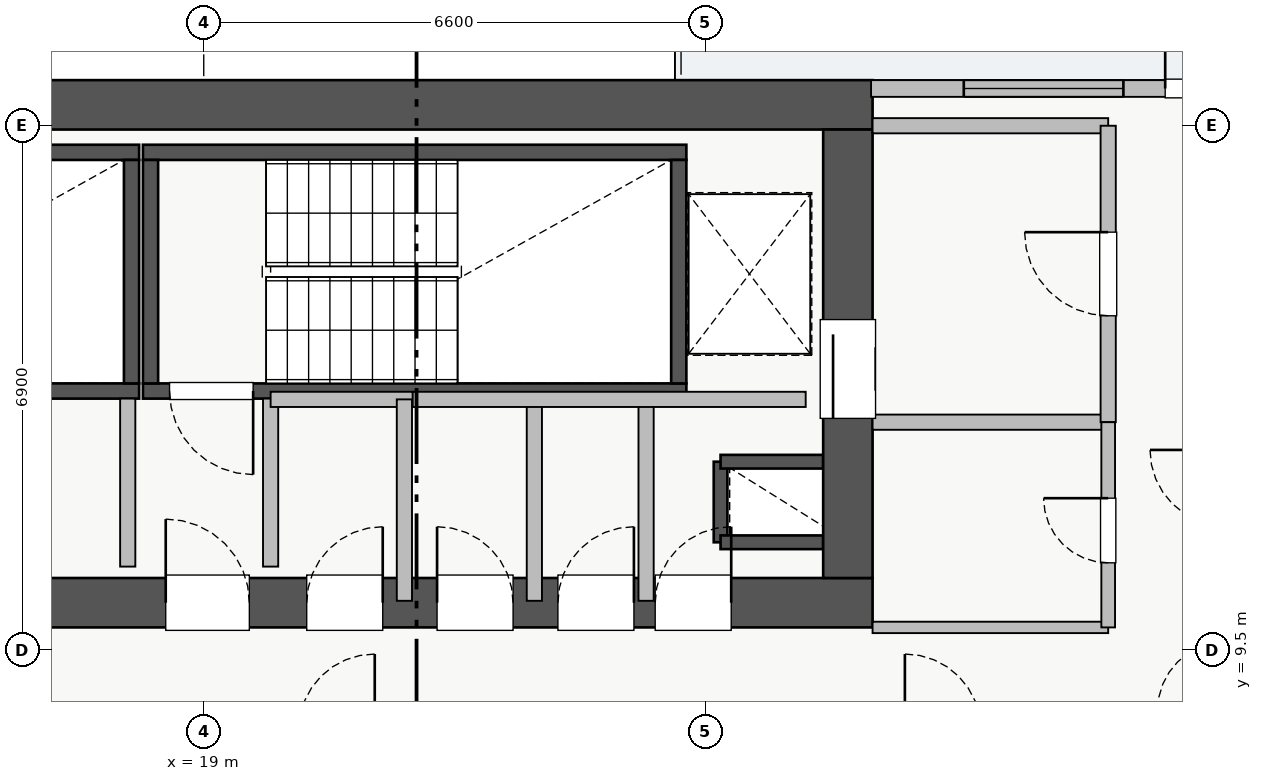
"""IFC4 building model, lengths in metres.
Left out: names, types, materials, properties, quantities, classifications, styles, units other than length and angle.
Written with IfcOpenShell. Run it as: python <this file> out.ifc"""

import sys

from ifc_helpers import new_model, si_unit, direction, frame, frame_2d, origin, place, context, subcontext, project, spatial, rectangle, extrude, source, transform, mapped, element, fill, save


model = new_model("IFC4")
c1 = context("Model", 3, precision=1e-05, world=origin(), true_north=direction((0.0, 1.0)))
c2 = subcontext(c1, "Body", "Model", "MODEL_VIEW")
j1 = project(units=[si_unit("LENGTHUNIT", "METRE"), si_unit("PLANEANGLEUNIT", "RADIAN")], contexts=[c1])
p1 = place(None, origin())
s1 = spatial("IfcSite", under=j1, at=p1, CompositionType="ELEMENT")
p2 = place(p1, origin())
s2 = spatial("IfcBuilding", under=s1, at=p2, CompositionType="ELEMENT")
p3 = place(p2, frame((0.0, 0.0, 153.5)))
s3 = spatial("IfcBuildingStorey", under=s2, at=p3, CompositionType="ELEMENT", Elevation=153.5)
p4 = place(p3, frame((25.8, 10.92, 0.0), z_axis=(0.0, 0.0, 1.0), x_axis=(0.0, 1.0, 0.0)))
e1 = element("IfcWall", 1, at=p4, inside=s3, PredefinedType="SHEAR", context=c2, shape_type="SweptSolid", body=[
    extrude(rectangle(XDim=1.06, YDim=0.18, at=frame_2d((0.53, 0.0))), origin(), (0.0, 0.0, 1.0), 3.07),
])
for number, where, z_axis, x_axis in (
    (2, (25.8, 11.98, 0.0), (0.0, 0.0, 1.0), (1.0, 0.0, 0.0)),
    (3, (25.8, 10.92, 0.0), (0.0, 0.0, 1.0), (1.0, 0.0, 0.0)),
):
    element("IfcWall", number, at=place(p3, frame(where, z_axis=z_axis, x_axis=x_axis)), inside=s3, PredefinedType="SHEAR", context=c2, shape_type="SweptSolid", body=[
        extrude(rectangle(XDim=1.35, YDim=0.18, at=frame_2d((0.675, 0.0))), origin(), (0.0, 0.0, 1.0), 3.07),
    ])
p5 = place(p3, frame((10.85, 12.91, 0.0), z_axis=(0.0, 0.0, 1.0), x_axis=(1.0, 0.0, 0.0)))
e4 = element("IfcWall", 4, at=p5, inside=s3, PredefinedType="SHEAR", context=c2, shape_type="SweptSolid", body=[
    extrude(rectangle(XDim=7.3, YDim=0.2, at=frame_2d((3.65, 0.0))), origin(), (0.0, 0.0, 1.0), 3.25),
])
p6 = place(p5, frame((0.35, 0.0, 0.0)))
e5 = element("IfcOpeningElement", 5, at=p6, cuts=e4, PredefinedType="OPENING", context=c2, shape_type="SweptSolid", body=[
    extrude(rectangle(XDim=1.1, YDim=2.05, at=frame_2d((0.55, 1.025))), frame((0.0, 0.11, 0.0), z_axis=(0.0, -1.0, 0.0), x_axis=(1.0, 0.0, 0.0)), (0.0, 0.0, 1.0), 0.22),
])
p7 = place(p3, frame((10.85, 16.05, 0.0), z_axis=(0.0, 0.0, 1.0), x_axis=(1.0, 0.0, 0.0)))
e6 = element("IfcWall", 6, at=p7, inside=s3, PredefinedType="SHEAR", context=c2, shape_type="SweptSolid", body=[
    extrude(rectangle(XDim=7.3, YDim=0.2, at=frame_2d((3.65, 0.0))), origin(), (0.0, 0.0, 1.0), 3.25),
])
p8 = place(p3, frame((18.05, 13.01, 0.0), z_axis=(0.0, 0.0, 1.0), x_axis=(0.0, 1.0, 0.0)))
e7 = element("IfcWall", 7, at=p8, inside=s3, PredefinedType="SHEAR", context=c2, shape_type="SweptSolid", body=[
    extrude(rectangle(XDim=2.94, YDim=0.2, at=frame_2d((1.47, 0.0))), origin(), (0.0, 0.0, 1.0), 3.25),
])
p9 = place(p3, frame((18.2, 12.91, 0.0), z_axis=(0.0, 0.0, 1.0), x_axis=(1.0, 0.0, 0.0)))
e8 = element("IfcWall", 8, at=p9, inside=s3, PredefinedType="SHEAR", context=c2, shape_type="SweptSolid", body=[
    extrude(rectangle(XDim=7.15, YDim=0.2, at=frame_2d((3.575, 0.0))), origin(), (0.0, 0.0, 1.0), 3.25),
])
p10 = place(p9, frame((0.35, 0.0, 0.0)))
e9 = element("IfcOpeningElement", 9, at=p10, cuts=e8, PredefinedType="OPENING", context=c2, shape_type="SweptSolid", body=[
    extrude(rectangle(XDim=1.1, YDim=2.05, at=frame_2d((0.55, 1.025))), frame((0.0, 0.11, 0.0), z_axis=(0.0, -1.0, 0.0), x_axis=(1.0, 0.0, 0.0)), (0.0, 0.0, 1.0), 0.22),
])
p11 = place(p3, frame((18.2, 16.05, 0.0), z_axis=(0.0, 0.0, 1.0), x_axis=(1.0, 0.0, 0.0)))
e10 = element("IfcWall", 10, at=p11, inside=s3, PredefinedType="SHEAR", context=c2, shape_type="SweptSolid", body=[
    extrude(rectangle(XDim=7.15, YDim=0.2, at=frame_2d((3.575, 0.0))), origin(), (0.0, 0.0, 1.0), 3.25),
])
for number, where, z_axis, x_axis in (
    (11, (18.3, 13.01, 0.0), (0.0, 0.0, 1.0), (0.0, 1.0, 0.0)),
    (12, (25.25, 13.01, 0.0), (0.0, 0.0, 1.0), (0.0, 1.0, 0.0)),
):
    element("IfcWall", number, at=place(p3, frame(where, z_axis=z_axis, x_axis=x_axis)), inside=s3, PredefinedType="SHEAR", context=c2, shape_type="SweptSolid", body=[
        extrude(rectangle(XDim=2.94, YDim=0.2, at=frame_2d((1.47, 0.0))), origin(), (0.0, 0.0, 1.0), 3.25),
    ])
p12 = place(p3, frame((10.2, 10.125, 0.0), z_axis=(0.0, 0.0, 1.0), x_axis=(1.0, 0.0, 0.0)))
e13 = element("IfcWall", 13, at=p12, inside=s3, PredefinedType="SHEAR", context=c2, shape_type="SweptSolid", body=[
    extrude(rectangle(XDim=17.6, YDim=0.65, at=frame_2d((8.8, 0.0))), origin(), (0.0, 0.0, 1.0), 3.25),
])
p13 = place(p12, frame((1.15, 0.0, 0.0)))
e14 = element("IfcOpeningElement", 14, at=p13, cuts=e13, PredefinedType="OPENING", context=c2, shape_type="SweptSolid", body=[
    extrude(rectangle(XDim=1.1, YDim=2.05, at=frame_2d((0.55, 1.025))), frame((0.0, 0.335, 0.0), z_axis=(0.0, -1.0, 0.0), x_axis=(1.0, 0.0, 0.0)), (0.0, 0.0, 1.0), 0.67),
])
p14 = place(p12, frame((8.3, 0.0, 0.0)))
e15 = element("IfcOpeningElement", 15, at=p14, cuts=e13, PredefinedType="OPENING", context=c2, shape_type="SweptSolid", body=[
    extrude(rectangle(XDim=1.1, YDim=2.05, at=frame_2d((0.55, 1.025))), frame((0.0, 0.335, 0.0), z_axis=(0.0, -1.0, 0.0), x_axis=(1.0, 0.0, 0.0)), (0.0, 0.0, 1.0), 0.67),
])
p15 = place(p12, frame((4.9, 0.0, 0.0)))
e16 = element("IfcOpeningElement", 16, at=p15, cuts=e13, PredefinedType="OPENING", context=c2, shape_type="SweptSolid", body=[
    extrude(rectangle(XDim=1.1, YDim=2.05, at=frame_2d((0.55, 1.025))), frame((0.0, 0.335, 0.0), z_axis=(0.0, -1.0, 0.0), x_axis=(1.0, 0.0, 0.0)), (0.0, 0.0, 1.0), 0.67),
])
p16 = place(p12, frame((14.74, 0.0, 0.0)))
e17 = element("IfcOpeningElement", 17, at=p16, cuts=e13, PredefinedType="OPENING", context=c2, shape_type="SweptSolid", body=[
    extrude(rectangle(XDim=1.0, YDim=2.05, at=frame_2d((0.5, 1.025))), frame((0.0, 0.335, 0.0), z_axis=(0.0, -1.0, 0.0), x_axis=(1.0, 0.0, 0.0)), (0.0, 0.0, 1.0), 0.67),
])
p17 = place(p12, frame((10.155, 0.0, 0.0)))
e18 = element("IfcOpeningElement", 18, at=p17, cuts=e13, PredefinedType="OPENING", context=c2, shape_type="SweptSolid", body=[
    extrude(rectangle(XDim=1.0, YDim=2.05, at=frame_2d((0.5, 1.025))), frame((0.0, 0.335, 0.0), z_axis=(0.0, -1.0, 0.0), x_axis=(1.0, 0.0, 0.0)), (0.0, 0.0, 1.0), 0.67),
])
p18 = place(p12, frame((11.87, 0.0, 0.0)))
e19 = element("IfcOpeningElement", 19, at=p18, cuts=e13, PredefinedType="OPENING", context=c2, shape_type="SweptSolid", body=[
    extrude(rectangle(XDim=1.0, YDim=2.05, at=frame_2d((0.5, 1.025))), frame((0.0, 0.335, 0.0), z_axis=(0.0, -1.0, 0.0), x_axis=(1.0, 0.0, 0.0)), (0.0, 0.0, 1.0), 0.67),
])
p19 = place(p12, frame((13.46, 0.0, 0.0)))
e20 = element("IfcOpeningElement", 20, at=p19, cuts=e13, PredefinedType="OPENING", context=c2, shape_type="SweptSolid", body=[
    extrude(rectangle(XDim=1.0, YDim=2.05, at=frame_2d((0.5, 1.025))), frame((0.0, 0.335, 0.0), z_axis=(0.0, -1.0, 0.0), x_axis=(1.0, 0.0, 0.0)), (0.0, 0.0, 1.0), 0.67),
])
p20 = place(p3, frame((10.2, 16.675, 0.0), z_axis=(0.0, 0.0, 1.0), x_axis=(1.0, 0.0, 0.0)))
e21 = element("IfcWall", 21, at=p20, inside=s3, PredefinedType="SHEAR", context=c2, shape_type="SweptSolid", body=[
    extrude(rectangle(XDim=17.6, YDim=0.65, at=frame_2d((8.8, 0.0))), origin(), (0.0, 0.0, 1.0), 3.25),
])
p21 = place(p3, frame((27.475, 10.45, 0.0), z_axis=(0.0, 0.0, 1.0), x_axis=(0.0, 1.0, 0.0)))
e22 = element("IfcWall", 22, at=p21, inside=s3, PredefinedType="SHEAR", context=c2, shape_type="SweptSolid", body=[
    extrude(rectangle(XDim=5.9, YDim=0.65, at=frame_2d((2.95, 0.0))), origin(), (0.0, 0.0, 1.0), 3.25),
])
p22 = place(p21, frame((2.1, 0.0, 0.0)))
e23 = element("IfcOpeningElement", 23, at=p22, cuts=e22, PredefinedType="OPENING", context=c2, shape_type="SweptSolid", body=[
    extrude(rectangle(XDim=1.3, YDim=2.05, at=frame_2d((0.65, 1.025))), frame((0.0, 0.335, 0.0), z_axis=(0.0, -1.0, 0.0), x_axis=(1.0, 0.0, 0.0)), (0.0, 0.0, 1.0), 0.67),
])
p23 = place(p3, frame((27.78, 16.89, 0.0), z_axis=(0.0, 0.0, 1.0), x_axis=(1.0, 0.0, 0.0)))
e24 = element("IfcWall", 24, at=p23, inside=s3, PredefinedType="STANDARD", context=c2, shape_type="SweptSolid", body=[
    extrude(rectangle(XDim=8.87, YDim=0.22, at=frame_2d((4.435, 0.0))), origin(), (0.0, 0.0, 1.0), 2.61),
])
p24 = place(p23, frame((3.87, 0.0, 0.0)))
e25 = element("IfcOpeningElement", 25, at=p24, cuts=e24, PredefinedType="OPENING", context=c2, shape_type="SweptSolid", body=[
    extrude(rectangle(XDim=1.2, YDim=2.1, at=frame_2d((0.6, 1.05))), frame((0.0, 0.12, 0.0), z_axis=(0.0, -1.0, 0.0), x_axis=(1.0, 0.0, 0.0)), (0.0, 0.0, 1.0), 0.24),
])
p25 = place(p23, frame((1.22, 0.0, 0.9)))
e26 = element("IfcOpeningElement", 26, at=p25, cuts=e24, PredefinedType="OPENING", context=c2, shape_type="SweptSolid", body=[
    extrude(rectangle(XDim=2.1, YDim=1.48, at=frame_2d((1.05, 0.74))), frame((0.0, 0.12, 0.0), z_axis=(0.0, -1.0, 0.0), x_axis=(1.0, 0.0, 0.0)), (0.0, 0.0, 1.0), 0.24),
])
p26 = place(p23, frame((6.48, 0.0, 0.9)))
e27 = element("IfcOpeningElement", 27, at=p26, cuts=e24, PredefinedType="OPENING", context=c2, shape_type="SweptSolid", body=[
    extrude(rectangle(XDim=2.1, YDim=1.5, at=frame_2d((1.05, 0.75))), frame((0.0, 0.12, 0.0), z_axis=(0.0, -1.0, 0.0), x_axis=(1.0, 0.0, 0.0)), (0.0, 0.0, 1.0), 0.24),
])
for number, where, z_axis, x_axis in (
    (28, (27.8, 16.4, 0.0), (0.0, 0.0, 1.0), (1.0, 0.0, 0.0)),
    (29, (27.8, 12.5, 0.0), (0.0, 0.0, 1.0), (1.0, 0.0, 0.0)),
):
    element("IfcWall", number, at=place(p3, frame(where, z_axis=z_axis, x_axis=x_axis)), inside=s3, PredefinedType="PARTITIONING", context=c2, shape_type="SweptSolid", body=[
        extrude(rectangle(XDim=3.1, YDim=0.2, at=frame_2d((1.55, 0.0))), origin(), (0.0, 0.0, 1.0), 3.07),
    ])
p27 = place(p3, frame((30.9, 12.5, 0.0), z_axis=(0.0, 0.0, 1.0), x_axis=(0.0, 1.0, 0.0)))
e30 = element("IfcWall", 30, at=p27, inside=s3, PredefinedType="PARTITIONING", context=c2, shape_type="SweptSolid", body=[
    extrude(rectangle(XDim=3.9, YDim=0.2, at=frame_2d((1.95, 0.0))), origin(), (0.0, 0.0, 1.0), 3.07),
])
p28 = place(p27, frame((1.4, 0.0, 0.0)))
e31 = element("IfcOpeningElement", 31, at=p28, cuts=e30, PredefinedType="OPENING", context=c2, shape_type="SweptSolid", body=[
    extrude(rectangle(XDim=1.1, YDim=2.05, at=frame_2d((0.55, 1.025))), frame((0.0, 0.11, 0.0), z_axis=(0.0, -1.0, 0.0), x_axis=(1.0, 0.0, 0.0)), (0.0, 0.0, 1.0), 0.22),
])
for number, where, z_axis, x_axis in (
    (32, (18.0, 10.6, 0.0), (0.0, 0.0, 1.0), (0.0, 1.0, 0.0)),
    (33, (19.88, 10.6, 0.0), (0.0, 0.0, 1.0), (0.0, 1.0, 0.0)),
):
    element("IfcWall", number, at=place(p3, frame(where, z_axis=z_axis, x_axis=x_axis)), inside=s3, PredefinedType="PARTITIONING", context=c2, shape_type="SweptSolid", body=[
        extrude(rectangle(XDim=2.21, YDim=0.2, at=frame_2d((1.105, 0.0))), origin(), (0.0, 0.0, 1.0), 3.07),
    ])
p29 = place(p3, frame((24.82, 10.15, 0.0), z_axis=(0.0, 0.0, 1.0), x_axis=(0.0, 1.0, 0.0)))
e34 = element("IfcWall", 34, at=p29, inside=s3, PredefinedType="PARTITIONING", context=c2, shape_type="SweptSolid", body=[
    extrude(rectangle(XDim=2.65, YDim=0.2, at=frame_2d((1.325, 0.0))), origin(), (0.0, 0.0, 1.0), 3.07),
])
p30 = place(p3, frame((19.88, 12.8, 0.0), z_axis=(0.0, 0.0, 1.0), x_axis=(1.0, 0.0, 0.0)))
e35 = element("IfcWall", 35, at=p30, inside=s3, PredefinedType="PARTITIONING", context=c2, shape_type="SweptSolid", body=[
    extrude(rectangle(XDim=1.87, YDim=0.2, at=frame_2d((0.935, 0.0))), origin(), (0.0, 0.0, 1.0), 3.07),
])
for number, where, z_axis, x_axis in (
    (36, (21.64, 10.15, 0.0), (0.0, 0.0, 1.0), (0.0, 1.0, 0.0)),
    (37, (23.35, 10.15, 0.0), (0.0, 0.0, 1.0), (0.0, 1.0, 0.0)),
):
    element("IfcWall", number, at=place(p3, frame(where, z_axis=z_axis, x_axis=x_axis)), inside=s3, PredefinedType="PARTITIONING", context=c2, shape_type="SweptSolid", body=[
        extrude(rectangle(XDim=2.65, YDim=0.2, at=frame_2d((1.325, 0.0))), origin(), (0.0, 0.0, 1.0), 3.07),
    ])
p31 = place(p3, frame((21.75, 12.8, 0.0), z_axis=(0.0, 0.0, 1.0), x_axis=(1.0, 0.0, 0.0)))
e38 = element("IfcWall", 38, at=p31, inside=s3, PredefinedType="PARTITIONING", context=c2, shape_type="SweptSolid", body=[
    extrude(rectangle(XDim=5.17, YDim=0.2, at=frame_2d((2.585, 0.0))), origin(), (0.0, 0.0, 1.0), 3.07),
])
p32 = place(p3, frame((27.8, 9.8, 0.0), z_axis=(0.0, 0.0, 1.0), x_axis=(1.0, 0.0, 0.0)))
e39 = element("IfcWall", 39, at=p32, inside=s3, PredefinedType="PARTITIONING", context=c2, shape_type="SweptSolid", body=[
    extrude(rectangle(XDim=3.1, YDim=0.15, at=frame_2d((1.55, 0.0))), origin(), (0.0, 0.0, 1.0), 3.07),
])
p33 = place(p3, frame((30.9, 9.8, 0.0), z_axis=(0.0, 0.0, 1.0), x_axis=(0.0, 1.0, 0.0)))
e40 = element("IfcWall", 40, at=p33, inside=s3, PredefinedType="PARTITIONING", context=c2, shape_type="SweptSolid", body=[
    extrude(rectangle(XDim=2.7, YDim=0.18, at=frame_2d((1.35, 0.0))), origin(), (0.0, 0.0, 1.0), 2.577),
])
p34 = place(p33, frame((0.85, 0.0, 0.0)))
e41 = element("IfcOpeningElement", 41, at=p34, cuts=e40, PredefinedType="OPENING", context=c2, shape_type="SweptSolid", body=[
    extrude(rectangle(XDim=0.85, YDim=2.05, at=frame_2d((0.425, 1.025))), frame((0.0, 0.1, 0.0), z_axis=(0.0, -1.0, 0.0), x_axis=(1.0, 0.0, 0.0)), (0.0, 0.0, 1.0), 0.2),
])
m1 = source(origin(), c2, "Body", "SweptSolid", [
    extrude(rectangle(XDim=1.2, YDim=2.1, at=frame_2d((0.6, 1.05))), frame((0.0, 0.025, 0.0), z_axis=(0.0, -1.0, 0.0), x_axis=(1.0, 0.0, 0.0)), (0.0, 0.0, 1.0), 0.05),
])
p35 = place(p24, origin())
e42 = element("IfcDoor", 42, at=p35, inside=s3, OperationType="SINGLE_SWING_LEFT", PredefinedType="DOOR", context=c2, shape_type="MappedRepresentation", body=[
    mapped(m1, transform((0.0, 0.0, 0.0), x_axis=(1.0, 0.0, 0.0), y_axis=(0.0, 1.0, 0.0), z_axis=(0.0, 0.0, 1.0), scale=1.0)),
])
fill(e25, e42)
m2 = source(origin(), c2, "Body", "SweptSolid", [
    extrude(rectangle(XDim=2.1, YDim=1.48, at=frame_2d((1.05, 0.74))), frame((0.0, 0.03, 0.0), z_axis=(0.0, -1.0, 0.0), x_axis=(1.0, 0.0, 0.0)), (0.0, 0.0, 1.0), 0.06),
])
p36 = place(p25, origin())
e43 = element("IfcWindow", 43, at=p36, inside=s3, PartitioningType="TRIPLE_PANEL_VERTICAL", PredefinedType="WINDOW", context=c2, shape_type="MappedRepresentation", body=[
    mapped(m2, transform((0.0, 0.0, 0.0), x_axis=(1.0, 0.0, 0.0), y_axis=(0.0, 1.0, 0.0), z_axis=(0.0, 0.0, 1.0), scale=1.0)),
])
fill(e26, e43)
m3 = source(origin(), c2, "Body", "SweptSolid", [
    extrude(rectangle(XDim=1.3, YDim=2.05, at=frame_2d((0.65, 1.025))), frame((0.0, 0.025, 0.0), z_axis=(0.0, -1.0, 0.0), x_axis=(1.0, 0.0, 0.0)), (0.0, 0.0, 1.0), 0.05),
])
p37 = place(p22, origin())
e44 = element("IfcDoor", 44, at=p37, inside=s3, OperationType="SLIDING_TO_RIGHT", PredefinedType="DOOR", context=c2, shape_type="MappedRepresentation", body=[
    mapped(m3, transform((0.0, 0.0, 0.0), x_axis=(1.0, 0.0, 0.0), y_axis=(0.0, 1.0, 0.0), z_axis=(0.0, 0.0, 1.0), scale=1.0)),
])
fill(e23, e44)
m4 = source(origin(), c2, "Body", "SweptSolid", [
    extrude(rectangle(XDim=1.1, YDim=2.05, at=frame_2d((0.55, 1.025))), frame((0.0, 0.025, 0.0), z_axis=(0.0, -1.0, 0.0), x_axis=(1.0, 0.0, 0.0)), (0.0, 0.0, 1.0), 0.05),
])
p38 = place(p14, origin())
e45 = element("IfcDoor", 45, at=p38, inside=s3, OperationType="SINGLE_SWING_LEFT", PredefinedType="DOOR", context=c2, shape_type="MappedRepresentation", body=[
    mapped(m4, transform((0.0, 0.0, 0.0), x_axis=(1.0, 0.0, 0.0), y_axis=(0.0, 1.0, 0.0), z_axis=(0.0, 0.0, 1.0), scale=1.0)),
])
fill(e15, e45)
p39 = place(p10, frame((1.1, 0.0, 0.0), z_axis=(0.0, 0.0, 1.0), x_axis=(-1.0, 0.0, 0.0)))
e46 = element("IfcDoor", 46, at=p39, inside=s3, OperationType="SINGLE_SWING_RIGHT", PredefinedType="DOOR", context=c2, shape_type="MappedRepresentation", body=[
    mapped(m4, transform((0.0, 0.0, 0.0), x_axis=(1.0, 0.0, 0.0), y_axis=(0.0, 1.0, 0.0), z_axis=(0.0, 0.0, 1.0), scale=1.0)),
])
fill(e9, e46)
m5 = source(origin(), c2, "Body", "SweptSolid", [
    extrude(rectangle(XDim=1.0, YDim=2.05, at=frame_2d((0.5, 1.025))), frame((0.0, 0.025, 0.0), z_axis=(0.0, -1.0, 0.0), x_axis=(1.0, 0.0, 0.0)), (0.0, 0.0, 1.0), 0.05),
])
p40 = place(p16, origin())
e47 = element("IfcDoor", 47, at=p40, inside=s3, OperationType="SINGLE_SWING_RIGHT", PredefinedType="DOOR", context=c2, shape_type="MappedRepresentation", body=[
    mapped(m5, transform((0.0, 0.0, 0.0), x_axis=(1.0, 0.0, 0.0), y_axis=(0.0, 1.0, 0.0), z_axis=(0.0, 0.0, 1.0), scale=1.0)),
])
fill(e17, e47)
p41 = place(p17, origin())
e48 = element("IfcDoor", 48, at=p41, inside=s3, OperationType="SINGLE_SWING_RIGHT", PredefinedType="DOOR", context=c2, shape_type="MappedRepresentation", body=[
    mapped(m5, transform((0.0, 0.0, 0.0), x_axis=(1.0, 0.0, 0.0), y_axis=(0.0, 1.0, 0.0), z_axis=(0.0, 0.0, 1.0), scale=1.0)),
])
fill(e18, e48)
p42 = place(p18, origin())
e49 = element("IfcDoor", 49, at=p42, inside=s3, OperationType="SINGLE_SWING_LEFT", PredefinedType="DOOR", context=c2, shape_type="MappedRepresentation", body=[
    mapped(m5, transform((0.0, 0.0, 0.0), x_axis=(1.0, 0.0, 0.0), y_axis=(0.0, 1.0, 0.0), z_axis=(0.0, 0.0, 1.0), scale=1.0)),
])
fill(e19, e49)
p43 = place(p19, origin())
e50 = element("IfcDoor", 50, at=p43, inside=s3, OperationType="SINGLE_SWING_RIGHT", PredefinedType="DOOR", context=c2, shape_type="MappedRepresentation", body=[
    mapped(m5, transform((0.0, 0.0, 0.0), x_axis=(1.0, 0.0, 0.0), y_axis=(0.0, 1.0, 0.0), z_axis=(0.0, 0.0, 1.0), scale=1.0)),
])
fill(e20, e50)
p44 = place(p28, origin())
e51 = element("IfcDoor", 51, at=p44, inside=s3, OperationType="SINGLE_SWING_RIGHT", PredefinedType="DOOR", context=c2, shape_type="MappedRepresentation", body=[
    mapped(m4, transform((0.0, 0.0, 0.0), x_axis=(1.0, 0.0, 0.0), y_axis=(0.0, 1.0, 0.0), z_axis=(0.0, 0.0, 1.0), scale=1.0)),
])
fill(e31, e51)
m6 = source(origin(), c2, "Body", "SweptSolid", [
    extrude(rectangle(XDim=0.85, YDim=2.05, at=frame_2d((0.425, 1.025))), frame((0.0, 0.025, 0.0), z_axis=(0.0, -1.0, 0.0), x_axis=(1.0, 0.0, 0.0)), (0.0, 0.0, 1.0), 0.05),
])
p45 = place(p34, origin())
e52 = element("IfcDoor", 52, at=p45, inside=s3, OperationType="SINGLE_SWING_RIGHT", PredefinedType="DOOR", context=c2, shape_type="MappedRepresentation", body=[
    mapped(m6, transform((0.0, 0.0, 0.0), x_axis=(1.0, 0.0, 0.0), y_axis=(0.0, 1.0, 0.0), z_axis=(0.0, 0.0, 1.0), scale=1.0)),
])
fill(e41, e52)
save(model, sys.argv[1])
